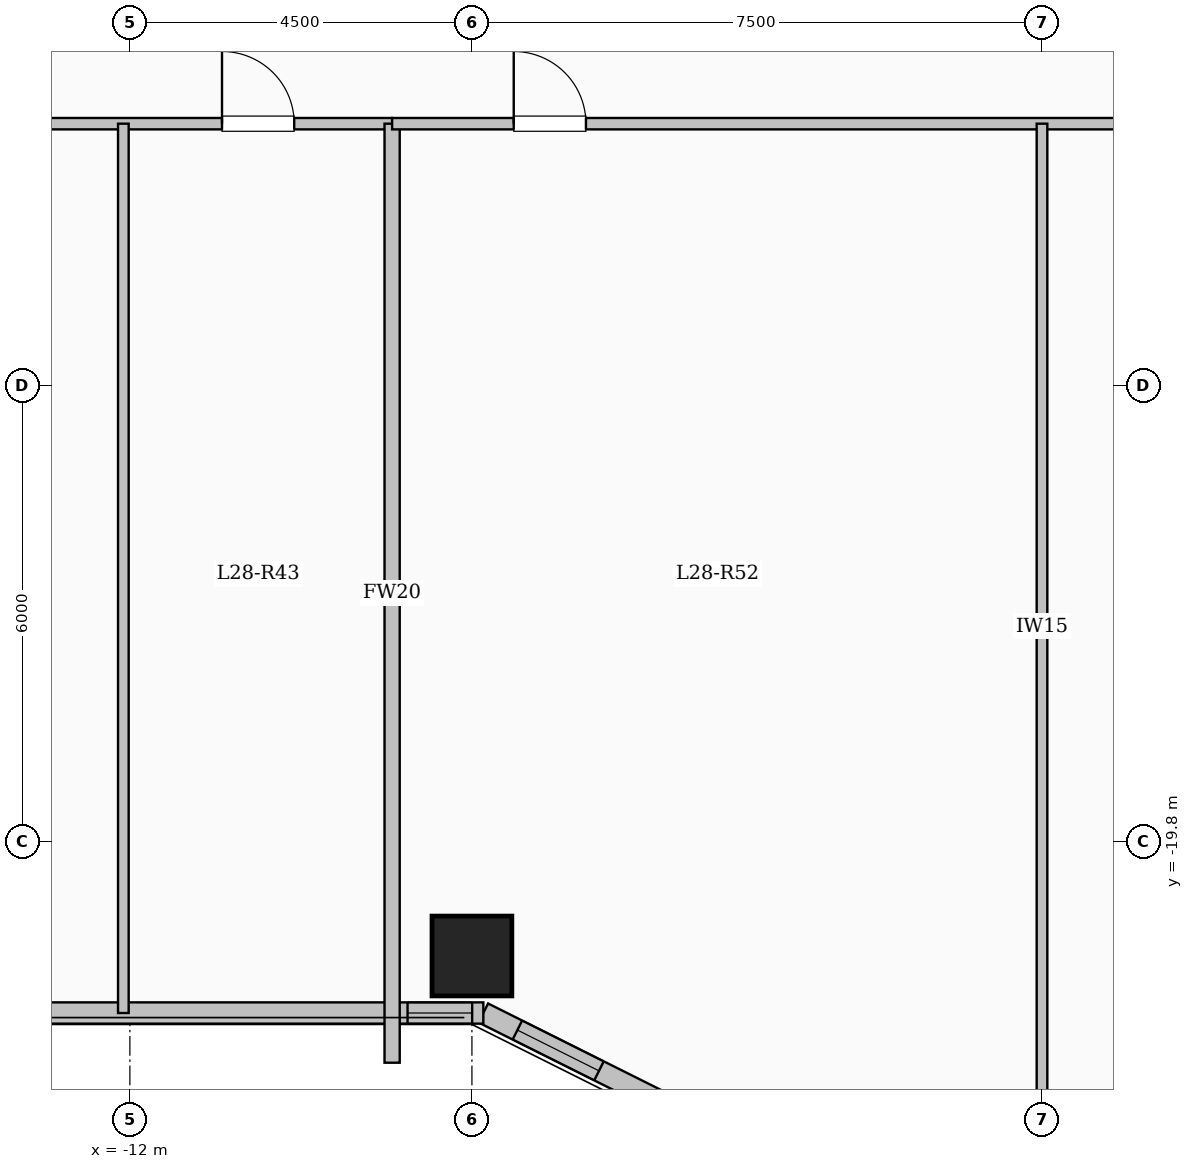
"""IFC4 building model, lengths in metres.
Left out: names, types, materials, properties, quantities, classifications, styles, units other than length and angle.
Written with IfcOpenShell. Run it as: python <this file> out.ifc"""

import sys

from ifc_helpers import new_model, si_unit, direction, frame, frame_2d, origin, origin_2d, place, context, subcontext, project, spatial, rectangle, extrude, element, fill, save


model = new_model("IFC4")
c1 = context("Model", 3, precision=1e-05, world=origin(), true_north=direction((0.0, 1.0)))
c2 = subcontext(c1, "Body", "Model", "MODEL_VIEW")
j1 = project(units=[si_unit("LENGTHUNIT", "METRE"), si_unit("PLANEANGLEUNIT", "RADIAN")], contexts=[c1])
p1 = place(None, origin())
s1 = spatial("IfcSite", under=j1, at=p1, CompositionType="ELEMENT")
p2 = place(p1, origin())
s2 = spatial("IfcBuilding", under=s1, at=p2, CompositionType="ELEMENT")
p3 = place(p2, frame((0.0, 0.0, 105.1)))
s3 = spatial("IfcBuildingStorey", under=s2, at=p3, CompositionType="ELEMENT", Elevation=105.1)
p4 = place(p3, frame((-7.5, -21.3, 0.0), z_axis=(0.0, 0.0, 1.0), x_axis=(1.0, 0.0, 0.0)))
e1 = element("IfcColumn", 1, at=p4, inside=s3, PredefinedType="COLUMN", context=c2, shape_type="SweptSolid", body=[
    extrude(rectangle(XDim=1.05, YDim=1.05, at=origin_2d()), origin(), (0.0, 0.0, 1.0), 3.35),
])
p5 = place(p3, frame((-4.35, -23.55, 0.0), z_axis=(0.0, 0.0, 1.0), x_axis=(-0.894427191, 0.4472135955, 0.0)))
e2 = element("IfcWall", 2, at=p5, inside=s3, PredefinedType="SOLIDWALL", context=c2, shape_type="SweptSolid", body=[
    extrude(rectangle(XDim=3.354, YDim=0.28, at=frame_2d((1.677, 0.0))), origin(), (0.0, 0.0, 1.0), 3.1),
])
p6 = place(p5, frame((1.653, 0.0, 0.95)))
e3 = element("IfcOpeningElement", 3, at=p6, cuts=e2, PredefinedType="OPENING", context=c2, shape_type="SweptSolid", body=[
    extrude(rectangle(XDim=1.2, YDim=1.5, at=frame_2d((0.6, 0.75))), frame((0.0, 0.15, 0.0), z_axis=(0.0, -1.0, 0.0), x_axis=(1.0, 0.0, 0.0)), (0.0, 0.0, 1.0), 0.3),
])
p7 = place(p3, frame((-7.35, -22.05, 0.0), z_axis=(0.0, 0.0, 1.0), x_axis=(-1.0, 0.0, 0.0)))
e4 = element("IfcWall", 4, at=p7, inside=s3, PredefinedType="SOLIDWALL", context=c2, shape_type="SweptSolid", body=[
    extrude(rectangle(XDim=13.8, YDim=0.28, at=frame_2d((6.9, 0.0))), origin(), (0.0, 0.0, 1.0), 3.1),
])
p8 = place(p7, frame((0.147, 0.0, 0.95)))
e5 = element("IfcOpeningElement", 5, at=p8, cuts=e4, PredefinedType="OPENING", context=c2, shape_type="SweptSolid", body=[
    extrude(rectangle(XDim=0.85, YDim=1.5, at=frame_2d((0.425, 0.75))), frame((0.0, 0.15, 0.0), z_axis=(0.0, -1.0, 0.0), x_axis=(1.0, 0.0, 0.0)), (0.0, 0.0, 1.0), 0.3),
])
p9 = place(p7, frame((6.075, 0.0, 0.9)))
e6 = element("IfcOpeningElement", 6, at=p9, cuts=e4, PredefinedType="OPENING", context=c2, shape_type="SweptSolid", body=[
    extrude(rectangle(XDim=1.8, YDim=1.65, at=frame_2d((0.9, 0.825))), frame((0.0, 0.15, 0.0), z_axis=(0.0, -1.0, 0.0), x_axis=(1.0, 0.0, 0.0)), (0.0, 0.0, 1.0), 0.3),
])
p10 = place(p7, frame((10.492, 0.0, 0.9)))
e7 = element("IfcOpeningElement", 7, at=p10, cuts=e4, PredefinedType="OPENING", context=c2, shape_type="SweptSolid", body=[
    extrude(rectangle(XDim=2.0, YDim=1.7, at=frame_2d((1.0, 0.85))), frame((0.0, 0.15, 0.0), z_axis=(0.0, -1.0, 0.0), x_axis=(1.0, 0.0, 0.0)), (0.0, 0.0, 1.0), 0.3),
])
p11 = place(p3, frame((-21.05, -10.35, 0.0), z_axis=(0.0, 0.0, 1.0), x_axis=(1.0, 0.0, 0.0)))
e8 = element("IfcWall", 8, at=p11, inside=s3, PredefinedType="PARTITIONING", context=c2, shape_type="SweptSolid", body=[
    extrude(rectangle(XDim=12.5, YDim=0.15, at=frame_2d((6.25, 0.0))), origin(), (0.0, 0.0, 1.0), 3.1),
])
p12 = place(p11, frame((1.736, 0.0, 0.0)))
e9 = element("IfcOpeningElement", 9, at=p12, cuts=e8, PredefinedType="OPENING", context=c2, shape_type="SweptSolid", body=[
    extrude(rectangle(XDim=0.95, YDim=2.15, at=frame_2d((0.475, 1.075))), frame((0.0, 0.085, 0.0), z_axis=(0.0, -1.0, 0.0), x_axis=(1.0, 0.0, 0.0)), (0.0, 0.0, 1.0), 0.17),
])
p13 = place(p11, frame((6.248, 0.0, 0.0)))
e10 = element("IfcOpeningElement", 10, at=p13, cuts=e8, PredefinedType="OPENING", context=c2, shape_type="SweptSolid", body=[
    extrude(rectangle(XDim=0.95, YDim=2.15, at=frame_2d((0.475, 1.075))), frame((0.0, 0.085, 0.0), z_axis=(0.0, -1.0, 0.0), x_axis=(1.0, 0.0, 0.0)), (0.0, 0.0, 1.0), 0.17),
])
p14 = place(p11, frame((10.262, 0.0, 0.0)))
e11 = element("IfcOpeningElement", 11, at=p14, cuts=e8, PredefinedType="OPENING", context=c2, shape_type="SweptSolid", body=[
    extrude(rectangle(XDim=0.95, YDim=2.15, at=frame_2d((0.475, 1.075))), frame((0.0, 0.085, 0.0), z_axis=(0.0, -1.0, 0.0), x_axis=(1.0, 0.0, 0.0)), (0.0, 0.0, 1.0), 0.17),
])
p15 = place(p3, frame((-12.086, -22.05, 0.0), z_axis=(0.0, 0.0, 1.0), x_axis=(0.0, 1.0, 0.0)))
e12 = element("IfcWall", 12, at=p15, inside=s3, PredefinedType="PARTITIONING", context=c2, shape_type="SweptSolid", body=[
    extrude(rectangle(XDim=11.7, YDim=0.14, at=frame_2d((5.85, 0.0))), origin(), (0.0, 0.0, 1.0), 3.1),
])
p16 = place(p3, frame((-8.55, -22.704, 0.0), z_axis=(0.0, 0.0, 1.0), x_axis=(0.0, 1.0, 0.0)))
e13 = element("IfcWall", 13, at=p16, inside=s3, PredefinedType="SOLIDWALL", context=c2, shape_type="SweptSolid", body=[
    extrude(rectangle(XDim=12.354, YDim=0.2, at=frame_2d((6.177, 0.0))), origin(), (0.0, 0.0, 1.0), 3.1),
])
p17 = place(p3, frame((-8.55, -10.35, 0.0), z_axis=(0.0, 0.0, 1.0), x_axis=(1.0, 0.0, 0.0)))
e14 = element("IfcWall", 14, at=p17, inside=s3, PredefinedType="PARTITIONING", context=c2, shape_type="SweptSolid", body=[
    extrude(rectangle(XDim=17.1, YDim=0.15, at=frame_2d((8.55, 0.0))), origin(), (0.0, 0.0, 1.0), 3.1),
])
p18 = place(p17, frame((1.6, 0.0, 0.0)))
e15 = element("IfcOpeningElement", 15, at=p18, cuts=e14, PredefinedType="OPENING", context=c2, shape_type="SweptSolid", body=[
    extrude(rectangle(XDim=0.95, YDim=2.15, at=frame_2d((0.475, 1.075))), frame((0.0, 0.085, 0.0), z_axis=(0.0, -1.0, 0.0), x_axis=(1.0, 0.0, 0.0)), (0.0, 0.0, 1.0), 0.17),
])
p19 = place(p17, frame((10.5, 0.0, 0.0)))
e16 = element("IfcOpeningElement", 16, at=p19, cuts=e14, PredefinedType="OPENING", context=c2, shape_type="SweptSolid", body=[
    extrude(rectangle(XDim=0.95, YDim=2.15, at=frame_2d((0.475, 1.075))), frame((0.0, 0.085, 0.0), z_axis=(0.0, -1.0, 0.0), x_axis=(1.0, 0.0, 0.0)), (0.0, 0.0, 1.0), 0.17),
])
p20 = place(p3, frame((0.0, -23.58, 0.0), z_axis=(0.0, 0.0, 1.0), x_axis=(0.0, 1.0, 0.0)))
e17 = element("IfcWall", 17, at=p20, inside=s3, PredefinedType="PARTITIONING", context=c2, shape_type="SweptSolid", body=[
    extrude(rectangle(XDim=13.23, YDim=0.14, at=frame_2d((6.615, 0.0))), origin(), (0.0, 0.0, 1.0), 3.1),
])
p21 = place(p6, origin())
e18 = element("IfcWindow", 18, at=p21, inside=s3, PartitioningType="SINGLE_PANEL", PredefinedType="WINDOW", context=c2, shape_type="SweptSolid", body=[
    extrude(rectangle(XDim=1.2, YDim=1.5, at=frame_2d((0.6, 0.75))), frame((0.0, 0.03, 0.0), z_axis=(0.0, -1.0, 0.0), x_axis=(1.0, 0.0, 0.0)), (0.0, 0.0, 1.0), 0.06),
])
fill(e3, e18)
p22 = place(p8, origin())
e19 = element("IfcWindow", 19, at=p22, inside=s3, PartitioningType="SINGLE_PANEL", PredefinedType="WINDOW", context=c2, shape_type="SweptSolid", body=[
    extrude(rectangle(XDim=0.85, YDim=1.5, at=frame_2d((0.425, 0.75))), frame((0.0, 0.03, 0.0), z_axis=(0.0, -1.0, 0.0), x_axis=(1.0, 0.0, 0.0)), (0.0, 0.0, 1.0), 0.06),
])
fill(e5, e19)
p23 = place(p14, origin())
e20 = element("IfcDoor", 20, at=p23, inside=s3, OperationType="SINGLE_SWING_LEFT", PredefinedType="DOOR", context=c2, shape_type="SweptSolid", body=[
    extrude(rectangle(XDim=0.95, YDim=2.15, at=frame_2d((0.475, 1.075))), frame((0.0, 0.025, 0.0), z_axis=(0.0, -1.0, 0.0), x_axis=(1.0, 0.0, 0.0)), (0.0, 0.0, 1.0), 0.05),
])
fill(e11, e20)
p24 = place(p18, origin())
e21 = element("IfcDoor", 21, at=p24, inside=s3, OperationType="SINGLE_SWING_LEFT", PredefinedType="DOOR", context=c2, shape_type="SweptSolid", body=[
    extrude(rectangle(XDim=0.95, YDim=2.15, at=frame_2d((0.475, 1.075))), frame((0.0, 0.025, 0.0), z_axis=(0.0, -1.0, 0.0), x_axis=(1.0, 0.0, 0.0)), (0.0, 0.0, 1.0), 0.05),
])
fill(e15, e21)
save(model, sys.argv[1])
